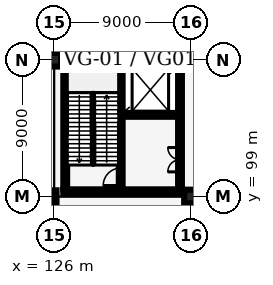
"""IFC4 building model, lengths in metres.
Left out: names, types, materials, properties, quantities, classifications, styles, units other than length and angle.
Written with IfcOpenShell. Run it as: python <this file> out.ifc"""

import sys

from ifc_helpers import new_model, si_unit, direction, frame, frame_2d, origin, origin_2d, place, context, subcontext, project, spatial, rectangle, i_section, extrude, element, fill, save


model = new_model("IFC4")
c1 = context("Model", 3, precision=1e-05, world=origin(), true_north=direction((0.0, 1.0)))
c2 = subcontext(c1, "Body", "Model", "MODEL_VIEW")
j1 = project(units=[si_unit("LENGTHUNIT", "METRE"), si_unit("PLANEANGLEUNIT", "RADIAN")], contexts=[c1])
p1 = place(None, origin())
s1 = spatial("IfcSite", under=j1, at=p1, CompositionType="ELEMENT")
p2 = place(p1, origin())
s2 = spatial("IfcBuilding", under=s1, at=p2, CompositionType="ELEMENT")
p3 = place(p2, origin())
s3 = spatial("IfcBuildingStorey", under=s2, at=p3, CompositionType="ELEMENT", Elevation=0.0)
p4 = place(p3, frame((126.0, 99.0, 0.0), z_axis=(0.0, 0.0, 1.0), x_axis=(1.0, 0.0, 0.0)))
e1 = element("IfcColumn", 1, at=p4, inside=s3, PredefinedType="COLUMN", context=c2, shape_type="SweptSolid", body=[
    extrude(i_section(OverallWidth=0.303, OverallDepth=0.814, WebThickness=0.021, FlangeThickness=0.04, FilletRadius=0.03, at=origin_2d()), origin(), (0.0, 0.0, 1.0), 6.0),
])
for number, where, z_axis, x_axis in (
    (2, (126.0, 108.0, 0.0), (0.0, 0.0, 1.0), (1.0, 0.0, 0.0)),
    (3, (135.0, 99.0, 0.0), (0.0, 0.0, 1.0), (1.0, 0.0, 0.0)),
):
    element("IfcColumn", number, at=place(p3, frame(where, z_axis=z_axis, x_axis=x_axis)), inside=s3, PredefinedType="COLUMN", context=c2, shape_type="SweptSolid", body=[
        extrude(rectangle(XDim=0.9, YDim=0.9, at=origin_2d()), origin(), (0.0, 0.0, 1.0), 6.0),
    ])
p5 = place(p3, frame((135.0, 108.0, 0.0), z_axis=(0.0, 0.0, 1.0), x_axis=(1.0, 0.0, 0.0)))
e4 = element("IfcColumn", 4, at=p5, inside=s3, PredefinedType="COLUMN", context=c2, shape_type="SweptSolid", body=[
    extrude(i_section(OverallWidth=0.303, OverallDepth=0.814, WebThickness=0.021, FlangeThickness=0.04, FilletRadius=0.03, at=origin_2d()), origin(), (0.0, 0.0, 1.0), 6.0),
])
p6 = place(p3, frame((135.146, 108.0, 0.0), z_axis=(0.0, 0.0, 1.0), x_axis=(1.0, 0.0, 0.0)))
e5 = element("IfcWall", 5, at=p6, inside=s3, PredefinedType="SOLIDWALL", context=c2, shape_type="SweptSolid", body=[
    extrude(rectangle(XDim=8.408, YDim=0.32, at=frame_2d((4.204, 0.0))), origin(), (0.0, 0.0, 1.0), 4.95),
])
p7 = place(p6, frame((1.154, 0.0, 0.0)))
e6 = element("IfcOpeningElement", 6, at=p7, cuts=e5, PredefinedType="OPENING", context=c2, shape_type="SweptSolid", body=[
    extrude(rectangle(XDim=6.4, YDim=3.2, at=frame_2d((3.2, 1.6))), frame((0.0, 0.17, 0.0), z_axis=(0.0, -1.0, 0.0), x_axis=(1.0, 0.0, 0.0)), (0.0, 0.0, 1.0), 0.34),
])
p8 = place(p3, frame((126.445, 108.0, 0.0), z_axis=(0.0, 0.0, 1.0), x_axis=(1.0, 0.0, 0.0)))
e7 = element("IfcWall", 7, at=p8, inside=s3, PredefinedType="SOLIDWALL", context=c2, shape_type="SweptSolid", body=[
    extrude(rectangle(XDim=8.408, YDim=0.29, at=frame_2d((4.204, 0.0))), origin(), (0.0, 0.0, 1.0), 4.95),
])
p9 = place(p3, frame((126.725, 99.47, 0.0), z_axis=(0.0, 0.0, 1.0), x_axis=(0.0, 1.0, 0.0)))
e8 = element("IfcWall", 8, at=p9, inside=s3, PredefinedType="SHEAR", context=c2, shape_type="SweptSolid", body=[
    extrude(rectangle(XDim=8.06, YDim=0.25, at=frame_2d((4.03, 0.0))), origin(), (0.0, 0.0, 1.0), 5.67),
])
p10 = place(p3, frame((134.275, 99.47, 0.0), z_axis=(0.0, 0.0, 1.0), x_axis=(0.0, 1.0, 0.0)))
e9 = element("IfcWall", 9, at=p10, inside=s3, PredefinedType="SHEAR", context=c2, shape_type="SweptSolid", body=[
    extrude(rectangle(XDim=8.06, YDim=0.25, at=frame_2d((4.03, 0.0))), origin(), (0.0, 0.0, 1.0), 5.67),
])
p11 = place(p10, frame((1.15, 0.0, 0.0)))
e10 = element("IfcOpeningElement", 10, at=p11, cuts=e9, PredefinedType="OPENING", context=c2, shape_type="SweptSolid", body=[
    extrude(rectangle(XDim=1.6, YDim=2.2, at=frame_2d((0.8, 1.1))), frame((0.0, 0.135, 0.0), z_axis=(0.0, -1.0, 0.0), x_axis=(1.0, 0.0, 0.0)), (0.0, 0.0, 1.0), 0.27),
])
for number, where, z_axis, x_axis in (
    (11, (126.6, 99.345, 0.0), (0.0, 0.0, 1.0), (1.0, 0.0, 0.0)),
    (12, (126.6, 107.655, 0.0), (0.0, 0.0, 1.0), (1.0, 0.0, 0.0)),
):
    element("IfcWall", number, at=place(p3, frame(where, z_axis=z_axis, x_axis=x_axis)), inside=s3, PredefinedType="SHEAR", context=c2, shape_type="SweptSolid", body=[
        extrude(rectangle(XDim=7.8, YDim=0.25, at=frame_2d((3.9, 0.0))), origin(), (0.0, 0.0, 1.0), 5.67),
    ])
p12 = place(p3, frame((130.375, 99.47, 0.0), z_axis=(0.0, 0.0, 1.0), x_axis=(0.0, 1.0, 0.0)))
e13 = element("IfcWall", 13, at=p12, inside=s3, PredefinedType="SHEAR", context=c2, shape_type="SweptSolid", body=[
    extrude(rectangle(XDim=8.06, YDim=0.25, at=frame_2d((4.03, 0.0))), origin(), (0.0, 0.0, 1.0), 5.67),
])
p13 = place(p12, frame((0.25, 0.0, 0.0)))
e14 = element("IfcOpeningElement", 14, at=p13, cuts=e13, PredefinedType="OPENING", context=c2, shape_type="SweptSolid", body=[
    extrude(rectangle(XDim=1.15, YDim=2.15, at=frame_2d((0.575, 1.075))), frame((0.0, 0.135, 0.0), z_axis=(0.0, -1.0, 0.0), x_axis=(1.0, 0.0, 0.0)), (0.0, 0.0, 1.0), 0.27),
])
p14 = place(p3, frame((130.5, 104.37, 0.0), z_axis=(0.0, 0.0, 1.0), x_axis=(1.0, 0.0, 0.0)))
e15 = element("IfcWall", 15, at=p14, inside=s3, PredefinedType="SHEAR", context=c2, shape_type="SweptSolid", body=[
    extrude(rectangle(XDim=3.65, YDim=0.25, at=frame_2d((1.825, 0.0))), origin(), (0.0, 0.0, 1.0), 5.67),
])
p15 = place(p14, frame((0.5, 0.0, 0.0)))
e16 = element("IfcOpeningElement", 16, at=p15, cuts=e15, PredefinedType="OPENING", context=c2, shape_type="SweptSolid", body=[
    extrude(rectangle(XDim=2.2, YDim=2.4, at=frame_2d((1.1, 1.2))), frame((0.0, 0.135, 0.0), z_axis=(0.0, -1.0, 0.0), x_axis=(1.0, 0.0, 0.0)), (0.0, 0.0, 1.0), 0.27),
])
p16 = place(p13, origin())
e17 = element("IfcDoor", 17, at=p16, inside=s3, OperationType="SINGLE_SWING_LEFT", PredefinedType="DOOR", context=c2, shape_type="SweptSolid", body=[
    extrude(rectangle(XDim=1.15, YDim=2.15, at=frame_2d((0.575, 1.075))), frame((0.0, 0.025, 0.0), z_axis=(0.0, -1.0, 0.0), x_axis=(1.0, 0.0, 0.0)), (0.0, 0.0, 1.0), 0.05),
])
fill(e14, e17)
p17 = place(p15, origin())
e18 = element("IfcDoor", 18, at=p17, inside=s3, OperationType="DOUBLE_DOOR_SLIDING", PredefinedType="DOOR", context=c2, shape_type="SweptSolid", body=[
    extrude(rectangle(XDim=2.2, YDim=2.4, at=frame_2d((1.1, 1.2))), frame((0.0, 0.025, 0.0), z_axis=(0.0, -1.0, 0.0), x_axis=(1.0, 0.0, 0.0)), (0.0, 0.0, 1.0), 0.05),
])
fill(e16, e18)
p18 = place(p11, origin())
e19 = element("IfcDoor", 19, at=p18, inside=s3, OperationType="DOUBLE_DOOR_SINGLE_SWING", PredefinedType="DOOR", context=c2, shape_type="SweptSolid", body=[
    extrude(rectangle(XDim=1.6, YDim=2.2, at=frame_2d((0.8, 1.1))), frame((0.0, 0.025, 0.0), z_axis=(0.0, -1.0, 0.0), x_axis=(1.0, 0.0, 0.0)), (0.0, 0.0, 1.0), 0.05),
])
fill(e10, e19)
save(model, sys.argv[1])
